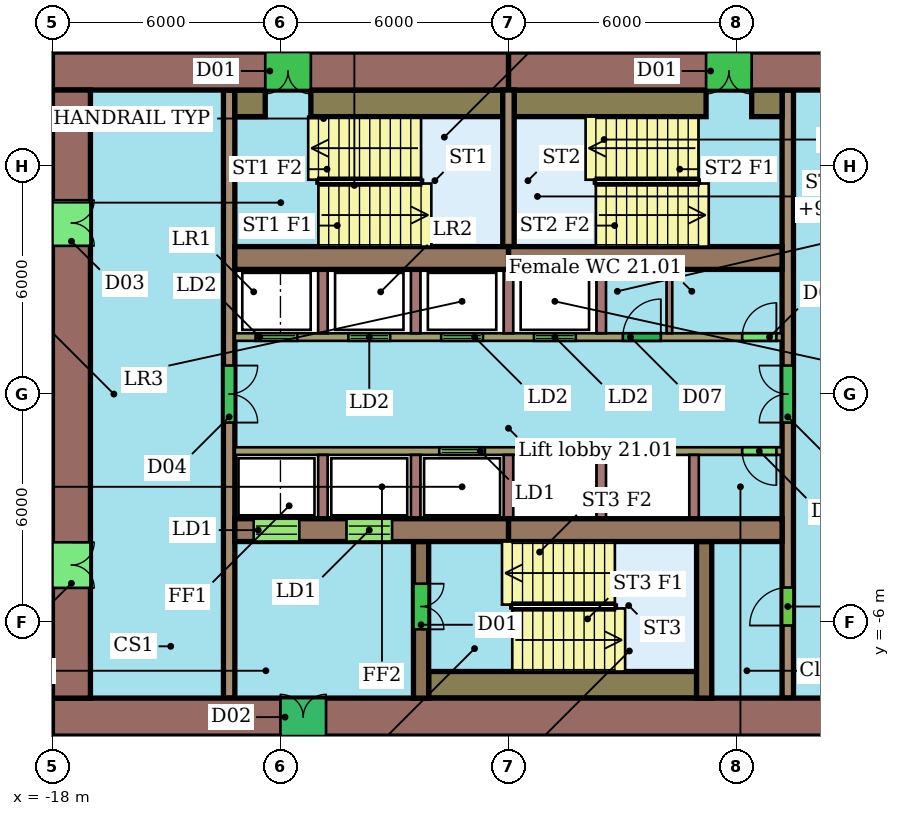
"""IFC4 building model, lengths in metres.
Left out: names, types, materials, properties, quantities, classifications, styles, units other than length and angle.
Written with IfcOpenShell. Run it as: python <this file> out.ifc"""

import sys

from ifc_helpers import new_model, si_unit, direction, frame, frame_2d, origin, place, context, subcontext, project, spatial, rectangle, extrude, element, fill, save


model = new_model("IFC4")
c1 = context("Model", 3, precision=1e-05, world=origin(), true_north=direction((0.0, 1.0)))
c2 = subcontext(c1, "Body", "Model", "MODEL_VIEW")
j1 = project(units=[si_unit("LENGTHUNIT", "METRE"), si_unit("PLANEANGLEUNIT", "RADIAN")], contexts=[c1])
p1 = place(None, origin())
s1 = spatial("IfcSite", under=j1, at=p1, CompositionType="ELEMENT")
p2 = place(p1, origin())
s2 = spatial("IfcBuilding", under=s1, at=p2, CompositionType="ELEMENT")
p3 = place(p2, frame((0.0, 0.0, 95.8)))
s3 = spatial("IfcBuildingStorey", under=s2, at=p3, CompositionType="ELEMENT", Elevation=95.8)
p4 = place(p3, frame((6.0, 8.5, 0.0), z_axis=(0.0, 0.0, 1.0), x_axis=(-1.0, 0.0, 0.0)))
e1 = element("IfcWall", 1, at=p4, inside=s3, PredefinedType="SHEAR", context=c2, shape_type="SweptSolid", body=[
    extrude(rectangle(XDim=12.0, YDim=1.0, at=frame_2d((6.0, 0.0))), origin(), (0.0, 0.0, 1.0), 3.3),
])
p5 = place(p4, frame((5.6, 0.0, 0.0)))
e2 = element("IfcOpeningElement", 2, at=p5, cuts=e1, PredefinedType="OPENING", context=c2, shape_type="SweptSolid", body=[
    extrude(rectangle(XDim=1.2, YDim=2.1, at=frame_2d((0.6, 1.05))), frame((0.0, 0.51, 0.0), z_axis=(0.0, -1.0, 0.0), x_axis=(1.0, 0.0, 0.0)), (0.0, 0.0, 1.0), 1.02),
])
p6 = place(p3, frame((-6.0, 8.5, 0.0), z_axis=(0.0, 0.0, 1.0), x_axis=(-1.0, 0.0, 0.0)))
e3 = element("IfcWall", 3, at=p6, inside=s3, PredefinedType="SHEAR", context=c2, shape_type="SweptSolid", body=[
    extrude(rectangle(XDim=12.0, YDim=1.0, at=frame_2d((6.0, 0.0))), origin(), (0.0, 0.0, 1.0), 3.3),
])
p7 = place(p6, frame((5.2, 0.0, 0.0)))
e4 = element("IfcOpeningElement", 4, at=p7, cuts=e3, PredefinedType="OPENING", context=c2, shape_type="SweptSolid", body=[
    extrude(rectangle(XDim=1.2, YDim=2.1, at=frame_2d((0.6, 1.05))), frame((0.0, 0.51, 0.0), z_axis=(0.0, -1.0, 0.0), x_axis=(1.0, 0.0, 0.0)), (0.0, 0.0, 1.0), 1.02),
])
p8 = place(p3, frame((-18.0, -8.5, 0.0), z_axis=(0.0, 0.0, 1.0), x_axis=(1.0, 0.0, 0.0)))
e5 = element("IfcWall", 5, at=p8, inside=s3, PredefinedType="SHEAR", context=c2, shape_type="SweptSolid", body=[
    extrude(rectangle(XDim=24.0, YDim=1.0, at=frame_2d((12.0, 0.0))), origin(), (0.0, 0.0, 1.0), 3.3),
])
p9 = place(p8, frame((6.0, 0.0, 0.0)))
e6 = element("IfcOpeningElement", 6, at=p9, cuts=e5, PredefinedType="OPENING", context=c2, shape_type="SweptSolid", body=[
    extrude(rectangle(XDim=1.2, YDim=2.1, at=frame_2d((0.6, 1.05))), frame((0.0, 0.51, 0.0), z_axis=(0.0, -1.0, 0.0), x_axis=(1.0, 0.0, 0.0)), (0.0, 0.0, 1.0), 1.02),
])
p10 = place(p3, frame((-17.5, 8.0, 0.0), z_axis=(0.0, 0.0, 1.0), x_axis=(0.0, -1.0, 0.0)))
e7 = element("IfcWall", 7, at=p10, inside=s3, PredefinedType="SHEAR", context=c2, shape_type="SweptSolid", body=[
    extrude(rectangle(XDim=16.0, YDim=1.0, at=frame_2d((8.0, 0.0))), origin(), (0.0, 0.0, 1.0), 3.3),
])
p11 = place(p10, frame((11.9, 0.0, 0.0)))
e8 = element("IfcOpeningElement", 8, at=p11, cuts=e7, PredefinedType="OPENING", context=c2, shape_type="SweptSolid", body=[
    extrude(rectangle(XDim=1.2, YDim=2.1, at=frame_2d((0.6, 1.05))), frame((0.0, 0.51, 0.0), z_axis=(0.0, -1.0, 0.0), x_axis=(1.0, 0.0, 0.0)), (0.0, 0.0, 1.0), 1.02),
])
p12 = place(p10, frame((2.9, 0.0, 0.0)))
e9 = element("IfcOpeningElement", 9, at=p12, cuts=e7, PredefinedType="OPENING", context=c2, shape_type="SweptSolid", body=[
    extrude(rectangle(XDim=1.2, YDim=2.1, at=frame_2d((0.6, 1.05))), frame((0.0, 0.51, 0.0), z_axis=(0.0, -1.0, 0.0), x_axis=(1.0, 0.0, 0.0)), (0.0, 0.0, 1.0), 1.02),
])
for number, where, z_axis, x_axis in (
    (10, (-13.2, 3.58, 0.0), (0.0, 0.0, 1.0), (1.0, 0.0, 0.0)),
    (11, (-6.0, 3.58, 0.0), (0.0, 0.0, 1.0), (1.0, 0.0, 0.0)),
):
    element("IfcWall", number, at=place(p3, frame(where, z_axis=z_axis, x_axis=x_axis)), inside=s3, PredefinedType="SHEAR", context=c2, shape_type="SweptSolid", body=[
        extrude(rectangle(XDim=7.2, YDim=0.6, at=frame_2d((3.6, 0.0))), origin(), (0.0, 0.0, 1.0), 3.3),
    ])
p13 = place(p3, frame((-13.2, -3.58, 0.0), z_axis=(0.0, 0.0, 1.0), x_axis=(1.0, 0.0, 0.0)))
e12 = element("IfcWall", 12, at=p13, inside=s3, PredefinedType="SHEAR", context=c2, shape_type="SweptSolid", body=[
    extrude(rectangle(XDim=7.2, YDim=0.6, at=frame_2d((3.6, 0.0))), origin(), (0.0, 0.0, 1.0), 3.3),
])
p14 = place(p13, frame((0.496, 0.0, 0.0)))
e13 = element("IfcOpeningElement", 13, at=p14, cuts=e12, PredefinedType="OPENING", context=c2, shape_type="SweptSolid", body=[
    extrude(rectangle(XDim=1.2, YDim=2.1, at=frame_2d((0.6, 1.05))), frame((0.0, 0.31, 0.0), z_axis=(0.0, -1.0, 0.0), x_axis=(1.0, 0.0, 0.0)), (0.0, 0.0, 1.0), 0.62),
])
p15 = place(p13, frame((2.938, 0.0, 0.0)))
e14 = element("IfcOpeningElement", 14, at=p15, cuts=e12, PredefinedType="OPENING", context=c2, shape_type="SweptSolid", body=[
    extrude(rectangle(XDim=1.2, YDim=2.1, at=frame_2d((0.6, 1.05))), frame((0.0, 0.31, 0.0), z_axis=(0.0, -1.0, 0.0), x_axis=(1.0, 0.0, 0.0)), (0.0, 0.0, 1.0), 0.62),
])
p16 = place(p3, frame((-6.0, -3.58, 0.0), z_axis=(0.0, 0.0, 1.0), x_axis=(1.0, 0.0, 0.0)))
e15 = element("IfcWall", 15, at=p16, inside=s3, PredefinedType="SHEAR", context=c2, shape_type="SweptSolid", body=[
    extrude(rectangle(XDim=7.2, YDim=0.6, at=frame_2d((3.6, 0.0))), origin(), (0.0, 0.0, 1.0), 3.3),
])
p17 = place(p3, frame((-13.35, 8.0, 0.0), z_axis=(0.0, 0.0, 1.0), x_axis=(0.0, -1.0, 0.0)))
e16 = element("IfcWall", 16, at=p17, inside=s3, PredefinedType="SHEAR", context=c2, shape_type="SweptSolid", body=[
    extrude(rectangle(XDim=16.0, YDim=0.3, at=frame_2d((8.0, 0.0))), origin(), (0.0, 0.0, 1.0), 3.3),
])
p18 = place(p17, frame((7.25, 0.0, 0.0)))
e17 = element("IfcOpeningElement", 17, at=p18, cuts=e16, PredefinedType="OPENING", context=c2, shape_type="SweptSolid", body=[
    extrude(rectangle(XDim=1.5, YDim=2.1, at=frame_2d((0.75, 1.05))), frame((0.0, 0.16, 0.0), z_axis=(0.0, -1.0, 0.0), x_axis=(1.0, 0.0, 0.0)), (0.0, 0.0, 1.0), 0.32),
])
p19 = place(p3, frame((1.35, -8.0, 0.0), z_axis=(0.0, 0.0, 1.0), x_axis=(0.0, 1.0, 0.0)))
e18 = element("IfcWall", 18, at=p19, inside=s3, PredefinedType="SHEAR", context=c2, shape_type="SweptSolid", body=[
    extrude(rectangle(XDim=16.0, YDim=0.3, at=frame_2d((8.0, 0.0))), origin(), (0.0, 0.0, 1.0), 3.3),
])
p20 = place(p19, frame((1.91, 0.0, 0.0)))
e19 = element("IfcOpeningElement", 19, at=p20, cuts=e18, PredefinedType="OPENING", context=c2, shape_type="SweptSolid", body=[
    extrude(rectangle(XDim=1.0, YDim=2.1, at=frame_2d((0.5, 1.05))), frame((0.0, 0.16, 0.0), z_axis=(0.0, -1.0, 0.0), x_axis=(1.0, 0.0, 0.0)), (0.0, 0.0, 1.0), 0.32),
])
p21 = place(p19, frame((7.25, 0.0, 0.0)))
e20 = element("IfcOpeningElement", 20, at=p21, cuts=e18, PredefinedType="OPENING", context=c2, shape_type="SweptSolid", body=[
    extrude(rectangle(XDim=1.5, YDim=2.1, at=frame_2d((0.75, 1.05))), frame((0.0, 0.16, 0.0), z_axis=(0.0, -1.0, 0.0), x_axis=(1.0, 0.0, 0.0)), (0.0, 0.0, 1.0), 0.32),
])
p22 = place(p3, frame((-13.2, 1.5, 0.0), z_axis=(0.0, 0.0, 1.0), x_axis=(1.0, 0.0, 0.0)))
e21 = element("IfcWall", 21, at=p22, inside=s3, PredefinedType="SHEAR", context=c2, shape_type="SweptSolid", body=[
    extrude(rectangle(XDim=14.4, YDim=0.2, at=frame_2d((7.2, 0.0))), origin(), (0.0, 0.0, 1.0), 3.3),
])
p23 = place(p22, frame((0.546, 0.0, 0.0)))
e22 = element("IfcOpeningElement", 22, at=p23, cuts=e21, PredefinedType="OPENING", context=c2, shape_type="SweptSolid", body=[
    extrude(rectangle(XDim=1.1, YDim=2.1, at=frame_2d((0.55, 1.05))), frame((0.0, 0.11, 0.0), z_axis=(0.0, -1.0, 0.0), x_axis=(1.0, 0.0, 0.0)), (0.0, 0.0, 1.0), 0.22),
])
p24 = place(p22, frame((2.988, 0.0, 0.0)))
e23 = element("IfcOpeningElement", 23, at=p24, cuts=e21, PredefinedType="OPENING", context=c2, shape_type="SweptSolid", body=[
    extrude(rectangle(XDim=1.1, YDim=2.1, at=frame_2d((0.55, 1.05))), frame((0.0, 0.11, 0.0), z_axis=(0.0, -1.0, 0.0), x_axis=(1.0, 0.0, 0.0)), (0.0, 0.0, 1.0), 0.22),
])
p25 = place(p22, frame((5.429, 0.0, 0.0)))
e24 = element("IfcOpeningElement", 24, at=p25, cuts=e21, PredefinedType="OPENING", context=c2, shape_type="SweptSolid", body=[
    extrude(rectangle(XDim=1.1, YDim=2.1, at=frame_2d((0.55, 1.05))), frame((0.0, 0.11, 0.0), z_axis=(0.0, -1.0, 0.0), x_axis=(1.0, 0.0, 0.0)), (0.0, 0.0, 1.0), 0.22),
])
p26 = place(p22, frame((7.871, 0.0, 0.0)))
e25 = element("IfcOpeningElement", 25, at=p26, cuts=e21, PredefinedType="OPENING", context=c2, shape_type="SweptSolid", body=[
    extrude(rectangle(XDim=1.1, YDim=2.1, at=frame_2d((0.55, 1.05))), frame((0.0, 0.11, 0.0), z_axis=(0.0, -1.0, 0.0), x_axis=(1.0, 0.0, 0.0)), (0.0, 0.0, 1.0), 0.22),
])
p27 = place(p22, frame((10.21, 0.0, 0.0)))
e26 = element("IfcOpeningElement", 26, at=p27, cuts=e21, PredefinedType="OPENING", context=c2, shape_type="SweptSolid", body=[
    extrude(rectangle(XDim=1.0, YDim=2.1, at=frame_2d((0.5, 1.05))), frame((0.0, 0.11, 0.0), z_axis=(0.0, -1.0, 0.0), x_axis=(1.0, 0.0, 0.0)), (0.0, 0.0, 1.0), 0.22),
])
p28 = place(p22, frame((13.35, 0.0, 0.0)))
e27 = element("IfcOpeningElement", 27, at=p28, cuts=e21, PredefinedType="OPENING", context=c2, shape_type="SweptSolid", body=[
    extrude(rectangle(XDim=0.9, YDim=2.1, at=frame_2d((0.45, 1.05))), frame((0.0, 0.11, 0.0), z_axis=(0.0, -1.0, 0.0), x_axis=(1.0, 0.0, 0.0)), (0.0, 0.0, 1.0), 0.22),
])
p29 = place(p3, frame((1.2, -1.5, 0.0), z_axis=(0.0, 0.0, 1.0), x_axis=(-1.0, 0.0, 0.0)))
e28 = element("IfcWall", 28, at=p29, inside=s3, PredefinedType="SHEAR", context=c2, shape_type="SweptSolid", body=[
    extrude(rectangle(XDim=14.4, YDim=0.2, at=frame_2d((7.2, 0.0))), origin(), (0.0, 0.0, 1.0), 3.3),
])
p30 = place(p29, frame((7.821, 0.0, 0.0)))
e29 = element("IfcOpeningElement", 29, at=p30, cuts=e28, PredefinedType="OPENING", context=c2, shape_type="SweptSolid", body=[
    extrude(rectangle(XDim=1.2, YDim=2.1, at=frame_2d((0.6, 1.05))), frame((0.0, 0.11, 0.0), z_axis=(0.0, -1.0, 0.0), x_axis=(1.0, 0.0, 0.0)), (0.0, 0.0, 1.0), 0.22),
])
p31 = place(p29, frame((0.15, 0.0, 0.0)))
e30 = element("IfcOpeningElement", 30, at=p31, cuts=e28, PredefinedType="OPENING", context=c2, shape_type="SweptSolid", body=[
    extrude(rectangle(XDim=0.9, YDim=2.1, at=frame_2d((0.45, 1.05))), frame((0.0, 0.11, 0.0), z_axis=(0.0, -1.0, 0.0), x_axis=(1.0, 0.0, 0.0)), (0.0, 0.0, 1.0), 0.22),
])
p32 = place(p3, frame((-8.3, -3.88, 0.0), z_axis=(0.0, 0.0, 1.0), x_axis=(0.0, -1.0, 0.0)))
e31 = element("IfcWall", 31, at=p32, inside=s3, PredefinedType="SHEAR", context=c2, shape_type="SweptSolid", body=[
    extrude(rectangle(XDim=4.12, YDim=0.4, at=frame_2d((2.06, 0.0))), origin(), (0.0, 0.0, 1.0), 3.3),
])
p33 = place(p32, frame((1.11, 0.0, 0.0)))
e32 = element("IfcOpeningElement", 32, at=p33, cuts=e31, PredefinedType="OPENING", context=c2, shape_type="SweptSolid", body=[
    extrude(rectangle(XDim=1.2, YDim=2.1, at=frame_2d((0.6, 1.05))), frame((0.0, 0.21, 0.0), z_axis=(0.0, -1.0, 0.0), x_axis=(1.0, 0.0, 0.0)), (0.0, 0.0, 1.0), 0.42),
])
p34 = place(p3, frame((-0.85, -3.88, 0.0), z_axis=(0.0, 0.0, 1.0), x_axis=(0.0, -1.0, 0.0)))
e33 = element("IfcWall", 33, at=p34, inside=s3, PredefinedType="SHEAR", context=c2, shape_type="SweptSolid", body=[
    extrude(rectangle(XDim=4.12, YDim=0.4, at=frame_2d((2.06, 0.0))), origin(), (0.0, 0.0, 1.0), 3.3),
])
p35 = place(p3, frame((-6.0, 3.88, 0.0), z_axis=(0.0, 0.0, 1.0), x_axis=(0.0, 1.0, 0.0)))
e34 = element("IfcWall", 34, at=p35, inside=s3, PredefinedType="SHEAR", context=c2, shape_type="SweptSolid", body=[
    extrude(rectangle(XDim=4.12, YDim=0.3, at=frame_2d((2.06, 0.0))), origin(), (0.0, 0.0, 1.0), 3.3),
])
p36 = place(p3, frame((-13.2, 7.65, 0.0), z_axis=(0.0, 0.0, 1.0), x_axis=(1.0, 0.0, 0.0)))
e35 = element("IfcWall", 35, at=p36, inside=s3, PredefinedType="SHEAR", context=c2, shape_type="SweptSolid", body=[
    extrude(rectangle(XDim=0.8, YDim=0.7, at=frame_2d((0.4, 0.0))), origin(), (0.0, 0.0, 1.0), 3.3),
])
for number, where, z_axis, x_axis in (
    (36, (-11.2, 7.65, 0.0), (0.0, 0.0, 1.0), (1.0, 0.0, 0.0)),
    (37, (-5.85, 7.65, 0.0), (0.0, 0.0, 1.0), (1.0, 0.0, 0.0)),
):
    element("IfcWall", number, at=place(p3, frame(where, z_axis=z_axis, x_axis=x_axis)), inside=s3, PredefinedType="SHEAR", context=c2, shape_type="SweptSolid", body=[
        extrude(rectangle(XDim=5.05, YDim=0.7, at=frame_2d((2.525, 0.0))), origin(), (0.0, 0.0, 1.0), 3.3),
    ])
p37 = place(p3, frame((0.4, 7.65, 0.0), z_axis=(0.0, 0.0, 1.0), x_axis=(1.0, 0.0, 0.0)))
e38 = element("IfcWall", 38, at=p37, inside=s3, PredefinedType="SHEAR", context=c2, shape_type="SweptSolid", body=[
    extrude(rectangle(XDim=0.8, YDim=0.7, at=frame_2d((0.4, 0.0))), origin(), (0.0, 0.0, 1.0), 3.3),
])
p38 = place(p3, frame((-8.1, -7.65, 0.0), z_axis=(0.0, 0.0, 1.0), x_axis=(1.0, 0.0, 0.0)))
e39 = element("IfcWall", 39, at=p38, inside=s3, PredefinedType="SHEAR", context=c2, shape_type="SweptSolid", body=[
    extrude(rectangle(XDim=7.05, YDim=0.7, at=frame_2d((3.525, 0.0))), origin(), (0.0, 0.0, 1.0), 3.3),
])
for number, where, z_axis, x_axis in (
    (40, (-10.883, 1.6, 0.0), (0.0, 0.0, 1.0), (0.0, 1.0, 0.0)),
    (41, (-8.442, 1.6, 0.0), (0.0, 0.0, 1.0), (0.0, 1.0, 0.0)),
    (42, (-6.0, 1.6, 0.0), (0.0, 0.0, 1.0), (0.0, 1.0, 0.0)),
    (43, (-3.558, 1.6, 0.0), (0.0, 0.0, 1.0), (0.0, 1.0, 0.0)),
):
    element("IfcWall", number, at=place(p3, frame(where, z_axis=z_axis, x_axis=x_axis)), inside=s3, PredefinedType="SHEAR", context=c2, shape_type="SweptSolid", body=[
        extrude(rectangle(XDim=1.68, YDim=0.25, at=frame_2d((0.84, 0.0))), origin(), (0.0, 0.0, 1.0), 3.3),
    ])
p39 = place(p3, frame((-1.765, 1.6, 0.0), z_axis=(0.0, 0.0, 1.0), x_axis=(0.0, 1.0, 0.0)))
e44 = element("IfcWall", 44, at=p39, inside=s3, PredefinedType="PARTITIONING", context=c2, shape_type="SweptSolid", body=[
    extrude(rectangle(XDim=1.68, YDim=0.15, at=frame_2d((0.84, 0.0))), origin(), (0.0, 0.0, 1.0), 3.3),
])
for number, where, z_axis, x_axis in (
    (45, (-10.883, -1.6, 0.0), (0.0, 0.0, 1.0), (0.0, -1.0, 0.0)),
    (46, (-8.442, -1.6, 0.0), (0.0, 0.0, 1.0), (0.0, -1.0, 0.0)),
    (47, (-6.0, -1.6, 0.0), (0.0, 0.0, 1.0), (0.0, -1.0, 0.0)),
    (48, (-3.558, -1.6, 0.0), (0.0, 0.0, 1.0), (0.0, -1.0, 0.0)),
    (49, (-1.117, -1.6, 0.0), (0.0, 0.0, 1.0), (0.0, -1.0, 0.0)),
):
    element("IfcWall", number, at=place(p3, frame(where, z_axis=z_axis, x_axis=x_axis)), inside=s3, PredefinedType="SHEAR", context=c2, shape_type="SweptSolid", body=[
        extrude(rectangle(XDim=1.68, YDim=0.25, at=frame_2d((0.84, 0.0))), origin(), (0.0, 0.0, 1.0), 3.3),
    ])
p40 = place(p5, origin())
e50 = element("IfcDoor", 50, at=p40, inside=s3, OperationType="DOUBLE_DOOR_SINGLE_SWING", PredefinedType="NOTDEFINED", context=c2, shape_type="SweptSolid", body=[
    extrude(rectangle(XDim=1.2, YDim=2.1, at=frame_2d((0.6, 1.05))), frame((0.0, 0.025, 0.0), z_axis=(0.0, -1.0, 0.0), x_axis=(1.0, 0.0, 0.0)), (0.0, 0.0, 1.0), 0.05),
])
fill(e2, e50)
p41 = place(p7, origin())
e51 = element("IfcDoor", 51, at=p41, inside=s3, OperationType="DOUBLE_DOOR_SINGLE_SWING", PredefinedType="NOTDEFINED", context=c2, shape_type="SweptSolid", body=[
    extrude(rectangle(XDim=1.2, YDim=2.1, at=frame_2d((0.6, 1.05))), frame((0.0, 0.025, 0.0), z_axis=(0.0, -1.0, 0.0), x_axis=(1.0, 0.0, 0.0)), (0.0, 0.0, 1.0), 0.05),
])
fill(e4, e51)
p42 = place(p9, origin())
e52 = element("IfcDoor", 52, at=p42, inside=s3, OperationType="DOUBLE_DOOR_SINGLE_SWING", PredefinedType="NOTDEFINED", context=c2, shape_type="SweptSolid", body=[
    extrude(rectangle(XDim=1.2, YDim=2.1, at=frame_2d((0.6, 1.05))), frame((0.0, 0.025, 0.0), z_axis=(0.0, -1.0, 0.0), x_axis=(1.0, 0.0, 0.0)), (0.0, 0.0, 1.0), 0.05),
])
fill(e6, e52)
p43 = place(p11, origin())
e53 = element("IfcDoor", 53, at=p43, inside=s3, OperationType="DOUBLE_DOOR_SINGLE_SWING", PredefinedType="NOTDEFINED", context=c2, shape_type="SweptSolid", body=[
    extrude(rectangle(XDim=1.2, YDim=2.1, at=frame_2d((0.6, 1.05))), frame((0.0, 0.025, 0.0), z_axis=(0.0, -1.0, 0.0), x_axis=(1.0, 0.0, 0.0)), (0.0, 0.0, 1.0), 0.05),
])
fill(e8, e53)
p44 = place(p12, origin())
e54 = element("IfcDoor", 54, at=p44, inside=s3, OperationType="DOUBLE_DOOR_SINGLE_SWING", PredefinedType="NOTDEFINED", context=c2, shape_type="SweptSolid", body=[
    extrude(rectangle(XDim=1.2, YDim=2.1, at=frame_2d((0.6, 1.05))), frame((0.0, 0.025, 0.0), z_axis=(0.0, -1.0, 0.0), x_axis=(1.0, 0.0, 0.0)), (0.0, 0.0, 1.0), 0.05),
])
fill(e9, e54)
p45 = place(p14, origin())
e55 = element("IfcDoor", 55, at=p45, inside=s3, OperationType="DOUBLE_DOOR_SLIDING", PredefinedType="NOTDEFINED", context=c2, shape_type="SweptSolid", body=[
    extrude(rectangle(XDim=1.2, YDim=2.1, at=frame_2d((0.6, 1.05))), frame((0.0, 0.025, 0.0), z_axis=(0.0, -1.0, 0.0), x_axis=(1.0, 0.0, 0.0)), (0.0, 0.0, 1.0), 0.05),
])
fill(e13, e55)
p46 = place(p15, origin())
e56 = element("IfcDoor", 56, at=p46, inside=s3, OperationType="DOUBLE_DOOR_SLIDING", PredefinedType="NOTDEFINED", context=c2, shape_type="SweptSolid", body=[
    extrude(rectangle(XDim=1.2, YDim=2.1, at=frame_2d((0.6, 1.05))), frame((0.0, 0.025, 0.0), z_axis=(0.0, -1.0, 0.0), x_axis=(1.0, 0.0, 0.0)), (0.0, 0.0, 1.0), 0.05),
])
fill(e14, e56)
p47 = place(p18, origin())
e57 = element("IfcDoor", 57, at=p47, inside=s3, OperationType="DOUBLE_DOOR_SINGLE_SWING", PredefinedType="NOTDEFINED", context=c2, shape_type="SweptSolid", body=[
    extrude(rectangle(XDim=1.5, YDim=2.1, at=frame_2d((0.75, 1.05))), frame((0.0, 0.025, 0.0), z_axis=(0.0, -1.0, 0.0), x_axis=(1.0, 0.0, 0.0)), (0.0, 0.0, 1.0), 0.05),
])
fill(e17, e57)
p48 = place(p20, origin())
e58 = element("IfcDoor", 58, at=p48, inside=s3, OperationType="SINGLE_SWING_LEFT", PredefinedType="NOTDEFINED", context=c2, shape_type="SweptSolid", body=[
    extrude(rectangle(XDim=1.0, YDim=2.1, at=frame_2d((0.5, 1.05))), frame((0.0, 0.025, 0.0), z_axis=(0.0, -1.0, 0.0), x_axis=(1.0, 0.0, 0.0)), (0.0, 0.0, 1.0), 0.05),
])
fill(e19, e58)
p49 = place(p21, origin())
e59 = element("IfcDoor", 59, at=p49, inside=s3, OperationType="DOUBLE_DOOR_SINGLE_SWING", PredefinedType="NOTDEFINED", context=c2, shape_type="SweptSolid", body=[
    extrude(rectangle(XDim=1.5, YDim=2.1, at=frame_2d((0.75, 1.05))), frame((0.0, 0.025, 0.0), z_axis=(0.0, -1.0, 0.0), x_axis=(1.0, 0.0, 0.0)), (0.0, 0.0, 1.0), 0.05),
])
fill(e20, e59)
p50 = place(p23, origin())
e60 = element("IfcDoor", 60, at=p50, inside=s3, OperationType="DOUBLE_DOOR_SLIDING", PredefinedType="NOTDEFINED", context=c2, shape_type="SweptSolid", body=[
    extrude(rectangle(XDim=1.1, YDim=2.1, at=frame_2d((0.55, 1.05))), frame((0.0, 0.025, 0.0), z_axis=(0.0, -1.0, 0.0), x_axis=(1.0, 0.0, 0.0)), (0.0, 0.0, 1.0), 0.05),
])
fill(e22, e60)
p51 = place(p24, origin())
e61 = element("IfcDoor", 61, at=p51, inside=s3, OperationType="DOUBLE_DOOR_SLIDING", PredefinedType="NOTDEFINED", context=c2, shape_type="SweptSolid", body=[
    extrude(rectangle(XDim=1.1, YDim=2.1, at=frame_2d((0.55, 1.05))), frame((0.0, 0.025, 0.0), z_axis=(0.0, -1.0, 0.0), x_axis=(1.0, 0.0, 0.0)), (0.0, 0.0, 1.0), 0.05),
])
fill(e23, e61)
p52 = place(p25, origin())
e62 = element("IfcDoor", 62, at=p52, inside=s3, OperationType="DOUBLE_DOOR_SLIDING", PredefinedType="NOTDEFINED", context=c2, shape_type="SweptSolid", body=[
    extrude(rectangle(XDim=1.1, YDim=2.1, at=frame_2d((0.55, 1.05))), frame((0.0, 0.025, 0.0), z_axis=(0.0, -1.0, 0.0), x_axis=(1.0, 0.0, 0.0)), (0.0, 0.0, 1.0), 0.05),
])
fill(e24, e62)
p53 = place(p26, origin())
e63 = element("IfcDoor", 63, at=p53, inside=s3, OperationType="DOUBLE_DOOR_SLIDING", PredefinedType="NOTDEFINED", context=c2, shape_type="SweptSolid", body=[
    extrude(rectangle(XDim=1.1, YDim=2.1, at=frame_2d((0.55, 1.05))), frame((0.0, 0.025, 0.0), z_axis=(0.0, -1.0, 0.0), x_axis=(1.0, 0.0, 0.0)), (0.0, 0.0, 1.0), 0.05),
])
fill(e25, e63)
p54 = place(p27, origin())
e64 = element("IfcDoor", 64, at=p54, inside=s3, OperationType="SINGLE_SWING_RIGHT", PredefinedType="NOTDEFINED", context=c2, shape_type="SweptSolid", body=[
    extrude(rectangle(XDim=1.0, YDim=2.1, at=frame_2d((0.5, 1.05))), frame((0.0, 0.025, 0.0), z_axis=(0.0, -1.0, 0.0), x_axis=(1.0, 0.0, 0.0)), (0.0, 0.0, 1.0), 0.05),
])
fill(e26, e64)
p55 = place(p28, origin())
e65 = element("IfcDoor", 65, at=p55, inside=s3, OperationType="SINGLE_SWING_RIGHT", PredefinedType="NOTDEFINED", context=c2, shape_type="SweptSolid", body=[
    extrude(rectangle(XDim=0.9, YDim=2.1, at=frame_2d((0.45, 1.05))), frame((0.0, 0.025, 0.0), z_axis=(0.0, -1.0, 0.0), x_axis=(1.0, 0.0, 0.0)), (0.0, 0.0, 1.0), 0.05),
])
fill(e27, e65)
p56 = place(p30, origin())
e66 = element("IfcDoor", 66, at=p56, inside=s3, OperationType="DOUBLE_DOOR_SLIDING", PredefinedType="NOTDEFINED", context=c2, shape_type="SweptSolid", body=[
    extrude(rectangle(XDim=1.2, YDim=2.1, at=frame_2d((0.6, 1.05))), frame((0.0, 0.025, 0.0), z_axis=(0.0, -1.0, 0.0), x_axis=(1.0, 0.0, 0.0)), (0.0, 0.0, 1.0), 0.05),
])
fill(e29, e66)
p57 = place(p31, origin())
e67 = element("IfcDoor", 67, at=p57, inside=s3, OperationType="SINGLE_SWING_LEFT", PredefinedType="NOTDEFINED", context=c2, shape_type="SweptSolid", body=[
    extrude(rectangle(XDim=0.9, YDim=2.1, at=frame_2d((0.45, 1.05))), frame((0.0, 0.025, 0.0), z_axis=(0.0, -1.0, 0.0), x_axis=(1.0, 0.0, 0.0)), (0.0, 0.0, 1.0), 0.05),
])
fill(e30, e67)
p58 = place(p33, origin())
e68 = element("IfcDoor", 68, at=p58, inside=s3, OperationType="DOUBLE_DOOR_SINGLE_SWING", PredefinedType="NOTDEFINED", context=c2, shape_type="SweptSolid", body=[
    extrude(rectangle(XDim=1.2, YDim=2.1, at=frame_2d((0.6, 1.05))), frame((0.0, 0.025, 0.0), z_axis=(0.0, -1.0, 0.0), x_axis=(1.0, 0.0, 0.0)), (0.0, 0.0, 1.0), 0.05),
])
fill(e32, e68)
save(model, sys.argv[1])
